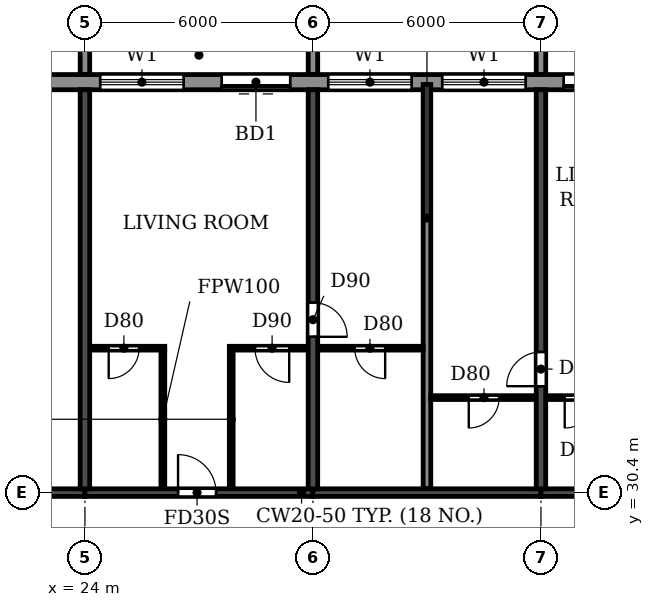
"""IFC4 building model, lengths in metres.
Left out: names, types, materials, properties, quantities, classifications, styles, units other than length and angle.
Written with IfcOpenShell. Run it as: python <this file> out.ifc"""

import sys

from ifc_helpers import new_model, si_unit, direction, frame, frame_2d, origin, place, context, subcontext, project, spatial, polyline, rectangle, outline, extrude, source, transform, mapped, element, fill, save


model = new_model("IFC4")
c1 = context("Model", 3, precision=1e-05, world=origin(), true_north=direction((0.0, 1.0)))
c2 = subcontext(c1, "Body", "Model", "MODEL_VIEW")
j1 = project(units=[si_unit("LENGTHUNIT", "METRE"), si_unit("PLANEANGLEUNIT", "RADIAN")], contexts=[c1])
p1 = place(None, origin())
s1 = spatial("IfcSite", under=j1, at=p1, CompositionType="ELEMENT")
p2 = place(p1, origin())
s2 = spatial("IfcBuilding", under=s1, at=p2, CompositionType="ELEMENT")
p3 = place(p2, frame((0.0, 0.0, 171.9)))
s3 = spatial("IfcBuildingStorey", under=s2, at=p3, CompositionType="ELEMENT", Elevation=171.9)
p4 = place(p3, frame((24.0, 30.5, 0.0), z_axis=(0.0, 0.0, 1.0), x_axis=(0.0, 1.0, 0.0)))
e1 = element("IfcWall", 1, at=p4, inside=s3, PredefinedType="SHEAR", context=c2, shape_type="SweptSolid", body=[
    extrude(rectangle(XDim=10.5, YDim=0.25, at=frame_2d((5.25, 0.0))), origin(), (0.0, 0.0, 1.0), 3.08),
])
p5 = place(p3, frame((30.0, 30.5, 0.0), z_axis=(0.0, 0.0, 1.0), x_axis=(0.0, 1.0, 0.0)))
e2 = element("IfcWall", 2, at=p5, inside=s3, PredefinedType="SHEAR", context=c2, shape_type="SweptSolid", body=[
    extrude(rectangle(XDim=10.5, YDim=0.25, at=frame_2d((5.25, 0.0))), origin(), (0.0, 0.0, 1.0), 3.08),
])
p6 = place(p5, frame((4.0, 0.0, 0.0)))
e3 = element("IfcOpeningElement", 3, at=p6, cuts=e2, PredefinedType="OPENING", context=c2, shape_type="SweptSolid", body=[
    extrude(rectangle(XDim=0.9, YDim=2.1, at=frame_2d((0.45, 1.05))), frame((0.0, 0.135, 0.0), z_axis=(0.0, -1.0, 0.0), x_axis=(1.0, 0.0, 0.0)), (0.0, 0.0, 1.0), 0.27),
])
p7 = place(p3, frame((36.0, 30.5, 0.0), z_axis=(0.0, 0.0, 1.0), x_axis=(0.0, 1.0, 0.0)))
e4 = element("IfcWall", 4, at=p7, inside=s3, PredefinedType="SHEAR", context=c2, shape_type="SweptSolid", body=[
    extrude(rectangle(XDim=10.5, YDim=0.25, at=frame_2d((5.25, 0.0))), origin(), (0.0, 0.0, 1.0), 3.08),
])
p8 = place(p7, frame((2.7, 0.0, 0.0)))
e5 = element("IfcOpeningElement", 5, at=p8, cuts=e4, PredefinedType="OPENING", context=c2, shape_type="SweptSolid", body=[
    extrude(rectangle(XDim=0.9, YDim=2.1, at=frame_2d((0.45, 1.05))), frame((0.0, 0.135, 0.0), z_axis=(0.0, -1.0, 0.0), x_axis=(1.0, 0.0, 0.0)), (0.0, 0.0, 1.0), 0.27),
])
p9 = place(p3, frame((18.2, 30.4, 0.0), z_axis=(0.0, 0.0, 1.0), x_axis=(1.0, 0.0, 0.0)))
e6 = element("IfcWall", 6, at=p9, inside=s3, PredefinedType="SHEAR", context=c2, shape_type="SweptSolid", body=[
    extrude(rectangle(XDim=5.8, YDim=0.2, at=frame_2d((2.9, 0.0))), origin(), (0.0, 0.0, 1.0), 2.48),
])
p10 = place(p9, frame((2.3, 0.0, 0.0)))
e7 = element("IfcOpeningElement", 7, at=p10, cuts=e6, PredefinedType="OPENING", context=c2, shape_type="SweptSolid", body=[
    extrude(rectangle(XDim=1.0, YDim=2.1, at=frame_2d((0.5, 1.05))), frame((0.0, 0.11, 0.0), z_axis=(0.0, -1.0, 0.0), x_axis=(1.0, 0.0, 0.0)), (0.0, 0.0, 1.0), 0.22),
])
p11 = place(p3, frame((24.0, 30.4, 0.0), z_axis=(0.0, 0.0, 1.0), x_axis=(1.0, 0.0, 0.0)))
e8 = element("IfcWall", 8, at=p11, inside=s3, PredefinedType="SHEAR", context=c2, shape_type="SweptSolid", body=[
    extrude(rectangle(XDim=6.0, YDim=0.2, at=frame_2d((3.0, 0.0))), origin(), (0.0, 0.0, 1.0), 2.48),
])
p12 = place(p11, frame((2.45, 0.0, 0.0)))
e9 = element("IfcOpeningElement", 9, at=p12, cuts=e8, PredefinedType="OPENING", context=c2, shape_type="SweptSolid", body=[
    extrude(rectangle(XDim=1.0, YDim=2.1, at=frame_2d((0.5, 1.05))), frame((0.0, 0.11, 0.0), z_axis=(0.0, -1.0, 0.0), x_axis=(1.0, 0.0, 0.0)), (0.0, 0.0, 1.0), 0.22),
])
p13 = place(p3, frame((30.0, 30.4, 0.0), z_axis=(0.0, 0.0, 1.0), x_axis=(1.0, 0.0, 0.0)))
e10 = element("IfcWall", 10, at=p13, inside=s3, PredefinedType="SHEAR", context=c2, shape_type="SweptSolid", body=[
    extrude(rectangle(XDim=6.0, YDim=0.2, at=frame_2d((3.0, 0.0))), origin(), (0.0, 0.0, 1.0), 2.48),
])
p14 = place(p3, frame((36.0, 30.4, 0.0), z_axis=(0.0, 0.0, 1.0), x_axis=(1.0, 0.0, 0.0)))
e11 = element("IfcWall", 11, at=p14, inside=s3, PredefinedType="SHEAR", context=c2, shape_type="SweptSolid", body=[
    extrude(rectangle(XDim=6.0, YDim=0.2, at=frame_2d((3.0, 0.0))), origin(), (0.0, 0.0, 1.0), 2.48),
])
p15 = place(p14, frame((2.45, 0.0, 0.0)))
e12 = element("IfcOpeningElement", 12, at=p15, cuts=e11, PredefinedType="OPENING", context=c2, shape_type="SweptSolid", body=[
    extrude(rectangle(XDim=1.0, YDim=2.1, at=frame_2d((0.5, 1.05))), frame((0.0, 0.11, 0.0), z_axis=(0.0, -1.0, 0.0), x_axis=(1.0, 0.0, 0.0)), (0.0, 0.0, 1.0), 0.22),
])
p16 = place(p3, frame((79.317, 41.2, 0.0), z_axis=(0.0, 0.0, 1.0), x_axis=(-1.0, 0.0, 0.0)))
e13 = element("IfcWall", 13, at=p16, inside=s3, PredefinedType="STANDARD", context=c2, shape_type="SweptSolid", body=[
    extrude(rectangle(XDim=56.634, YDim=0.4, at=frame_2d((28.317, 0.0))), origin(), (0.0, 0.0, 1.0), 3.08),
])
p17 = place(p16, frame((52.717, 0.0, 0.9)))
e14 = element("IfcOpeningElement", 14, at=p17, cuts=e13, PredefinedType="OPENING", context=c2, shape_type="SweptSolid", body=[
    extrude(rectangle(XDim=2.2, YDim=1.5, at=frame_2d((1.1, 0.75))), frame((0.0, 0.21, 0.0), z_axis=(0.0, -1.0, 0.0), x_axis=(1.0, 0.0, 0.0)), (0.0, 0.0, 1.0), 0.42),
])
p18 = place(p16, frame((49.917, 0.0, 0.0)))
e15 = element("IfcOpeningElement", 15, at=p18, cuts=e13, PredefinedType="OPENING", context=c2, shape_type="SweptSolid", body=[
    extrude(rectangle(XDim=1.8, YDim=2.4, at=frame_2d((0.9, 1.2))), frame((0.0, 0.21, 0.0), z_axis=(0.0, -1.0, 0.0), x_axis=(1.0, 0.0, 0.0)), (0.0, 0.0, 1.0), 0.42),
])
p19 = place(p16, frame((46.717, 0.0, 0.9)))
e16 = element("IfcOpeningElement", 16, at=p19, cuts=e13, PredefinedType="OPENING", context=c2, shape_type="SweptSolid", body=[
    extrude(rectangle(XDim=2.2, YDim=1.5, at=frame_2d((1.1, 0.75))), frame((0.0, 0.21, 0.0), z_axis=(0.0, -1.0, 0.0), x_axis=(1.0, 0.0, 0.0)), (0.0, 0.0, 1.0), 0.42),
])
p20 = place(p16, frame((43.717, 0.0, 0.9)))
e17 = element("IfcOpeningElement", 17, at=p20, cuts=e13, PredefinedType="OPENING", context=c2, shape_type="SweptSolid", body=[
    extrude(rectangle(XDim=2.2, YDim=1.5, at=frame_2d((1.1, 0.75))), frame((0.0, 0.21, 0.0), z_axis=(0.0, -1.0, 0.0), x_axis=(1.0, 0.0, 0.0)), (0.0, 0.0, 1.0), 0.42),
])
p21 = place(p16, frame((40.917, 0.0, 0.0)))
e18 = element("IfcOpeningElement", 18, at=p21, cuts=e13, PredefinedType="OPENING", context=c2, shape_type="SweptSolid", body=[
    extrude(rectangle(XDim=1.8, YDim=2.4, at=frame_2d((0.9, 1.2))), frame((0.0, 0.21, 0.0), z_axis=(0.0, -1.0, 0.0), x_axis=(1.0, 0.0, 0.0)), (0.0, 0.0, 1.0), 0.42),
])
p22 = place(p16, frame((37.717, 0.0, 0.9)))
e19 = element("IfcOpeningElement", 19, at=p22, cuts=e13, PredefinedType="OPENING", context=c2, shape_type="SweptSolid", body=[
    extrude(rectangle(XDim=2.2, YDim=1.5, at=frame_2d((1.1, 0.75))), frame((0.0, 0.21, 0.0), z_axis=(0.0, -1.0, 0.0), x_axis=(1.0, 0.0, 0.0)), (0.0, 0.0, 1.0), 0.42),
])
p23 = place(p16, frame((34.717, 0.0, 0.9)))
e20 = element("IfcOpeningElement", 20, at=p23, cuts=e13, PredefinedType="OPENING", context=c2, shape_type="SweptSolid", body=[
    extrude(rectangle(XDim=2.2, YDim=1.5, at=frame_2d((1.1, 0.75))), frame((0.0, 0.21, 0.0), z_axis=(0.0, -1.0, 0.0), x_axis=(1.0, 0.0, 0.0)), (0.0, 0.0, 1.0), 0.42),
])
p24 = place(p16, frame((31.717, 0.0, 0.9)))
e21 = element("IfcOpeningElement", 21, at=p24, cuts=e13, PredefinedType="OPENING", context=c2, shape_type="SweptSolid", body=[
    extrude(rectangle(XDim=2.2, YDim=1.5, at=frame_2d((1.1, 0.75))), frame((0.0, 0.21, 0.0), z_axis=(0.0, -1.0, 0.0), x_axis=(1.0, 0.0, 0.0)), (0.0, 0.0, 1.0), 0.42),
])
p25 = place(p16, frame((28.717, 0.0, 0.9)))
e22 = element("IfcOpeningElement", 22, at=p25, cuts=e13, PredefinedType="OPENING", context=c2, shape_type="SweptSolid", body=[
    extrude(rectangle(XDim=2.2, YDim=1.5, at=frame_2d((1.1, 0.75))), frame((0.0, 0.21, 0.0), z_axis=(0.0, -1.0, 0.0), x_axis=(1.0, 0.0, 0.0)), (0.0, 0.0, 1.0), 0.42),
])
p26 = place(p16, frame((25.917, 0.0, 0.0)))
e23 = element("IfcOpeningElement", 23, at=p26, cuts=e13, PredefinedType="OPENING", context=c2, shape_type="SweptSolid", body=[
    extrude(rectangle(XDim=1.8, YDim=2.4, at=frame_2d((0.9, 1.2))), frame((0.0, 0.21, 0.0), z_axis=(0.0, -1.0, 0.0), x_axis=(1.0, 0.0, 0.0)), (0.0, 0.0, 1.0), 0.42),
])
p27 = place(p16, frame((22.717, 0.0, 0.9)))
e24 = element("IfcOpeningElement", 24, at=p27, cuts=e13, PredefinedType="OPENING", context=c2, shape_type="SweptSolid", body=[
    extrude(rectangle(XDim=2.2, YDim=1.5, at=frame_2d((1.1, 0.75))), frame((0.0, 0.21, 0.0), z_axis=(0.0, -1.0, 0.0), x_axis=(1.0, 0.0, 0.0)), (0.0, 0.0, 1.0), 0.42),
])
p28 = place(p16, frame((19.917, 0.0, 0.0)))
e25 = element("IfcOpeningElement", 25, at=p28, cuts=e13, PredefinedType="OPENING", context=c2, shape_type="SweptSolid", body=[
    extrude(rectangle(XDim=1.8, YDim=2.4, at=frame_2d((0.9, 1.2))), frame((0.0, 0.21, 0.0), z_axis=(0.0, -1.0, 0.0), x_axis=(1.0, 0.0, 0.0)), (0.0, 0.0, 1.0), 0.42),
])
p29 = place(p16, frame((16.717, 0.0, 0.9)))
e26 = element("IfcOpeningElement", 26, at=p29, cuts=e13, PredefinedType="OPENING", context=c2, shape_type="SweptSolid", body=[
    extrude(rectangle(XDim=2.2, YDim=1.5, at=frame_2d((1.1, 0.75))), frame((0.0, 0.21, 0.0), z_axis=(0.0, -1.0, 0.0), x_axis=(1.0, 0.0, 0.0)), (0.0, 0.0, 1.0), 0.42),
])
p30 = place(p16, frame((13.717, 0.0, 0.9)))
e27 = element("IfcOpeningElement", 27, at=p30, cuts=e13, PredefinedType="OPENING", context=c2, shape_type="SweptSolid", body=[
    extrude(rectangle(XDim=2.2, YDim=1.5, at=frame_2d((1.1, 0.75))), frame((0.0, 0.21, 0.0), z_axis=(0.0, -1.0, 0.0), x_axis=(1.0, 0.0, 0.0)), (0.0, 0.0, 1.0), 0.42),
])
p31 = place(p16, frame((10.917, 0.0, 0.0)))
e28 = element("IfcOpeningElement", 28, at=p31, cuts=e13, PredefinedType="OPENING", context=c2, shape_type="SweptSolid", body=[
    extrude(rectangle(XDim=1.8, YDim=2.4, at=frame_2d((0.9, 1.2))), frame((0.0, 0.21, 0.0), z_axis=(0.0, -1.0, 0.0), x_axis=(1.0, 0.0, 0.0)), (0.0, 0.0, 1.0), 0.42),
])
p32 = place(p16, frame((7.717, 0.0, 0.9)))
e29 = element("IfcOpeningElement", 29, at=p32, cuts=e13, PredefinedType="OPENING", context=c2, shape_type="SweptSolid", body=[
    extrude(rectangle(XDim=2.2, YDim=1.5, at=frame_2d((1.1, 0.75))), frame((0.0, 0.21, 0.0), z_axis=(0.0, -1.0, 0.0), x_axis=(1.0, 0.0, 0.0)), (0.0, 0.0, 1.0), 0.42),
])
p33 = place(p16, frame((4.717, 0.0, 0.9)))
e30 = element("IfcOpeningElement", 30, at=p33, cuts=e13, PredefinedType="OPENING", context=c2, shape_type="SweptSolid", body=[
    extrude(rectangle(XDim=2.2, YDim=1.5, at=frame_2d((1.1, 0.75))), frame((0.0, 0.21, 0.0), z_axis=(0.0, -1.0, 0.0), x_axis=(1.0, 0.0, 0.0)), (0.0, 0.0, 1.0), 0.42),
])
p34 = place(p16, frame((1.917, 0.0, 0.0)))
e31 = element("IfcOpeningElement", 31, at=p34, cuts=e13, PredefinedType="OPENING", context=c2, shape_type="SweptSolid", body=[
    extrude(rectangle(XDim=1.8, YDim=2.4, at=frame_2d((0.9, 1.2))), frame((0.0, 0.21, 0.0), z_axis=(0.0, -1.0, 0.0), x_axis=(1.0, 0.0, 0.0)), (0.0, 0.0, 1.0), 0.42),
])
m1 = source(origin(), c2, "Body", "SweptSolid", [
    extrude(outline(polyline([(0.0, 0.0), (0.25, 0.0), (0.25, 3.1), (0.0, 3.1), (0.0, 0.0)])), origin(), (0.0, 0.0, 1.0), 3.1),
])
for number, where in (
    (32, (23.875, 41.4, 0.0)),
    (33, (29.875, 41.4, 0.0)),
    (34, (35.875, 41.4, 0.0)),
):
    element("IfcWall", number, at=place(p3, frame(where)), inside=s3, PredefinedType="STANDARD", context=c2, shape_type="MappedRepresentation", body=[
        mapped(m1, transform((0.0, 0.0, 0.0))),
    ])
p35 = place(p3, frame((33.0, 30.51, 0.0), z_axis=(0.0, 0.0, 1.0), x_axis=(0.0, 1.0, 0.0)))
e35 = element("IfcWall", 35, at=p35, inside=s3, PredefinedType="PARTITIONING", context=c2, shape_type="SweptSolid", body=[
    extrude(rectangle(XDim=10.63, YDim=0.2, at=frame_2d((5.315, 0.0))), origin(), (0.0, 0.0, 1.0), 3.08),
])
p36 = place(p3, frame((33.1, 32.9, 0.0), z_axis=(0.0, 0.0, 1.0), x_axis=(1.0, 0.0, 0.0)))
e36 = element("IfcWall", 36, at=p36, inside=s3, PredefinedType="PARTITIONING", context=c2, shape_type="SweptSolid", body=[
    extrude(rectangle(XDim=2.765, YDim=0.1, at=frame_2d((1.382, 0.0))), origin(), (0.0, 0.0, 1.0), 3.08),
])
p37 = place(p36, frame((1.0, 0.0, 0.0)))
e37 = element("IfcOpeningElement", 37, at=p37, cuts=e36, PredefinedType="OPENING", context=c2, shape_type="SweptSolid", body=[
    extrude(rectangle(XDim=0.8, YDim=2.1, at=frame_2d((0.4, 1.05))), frame((0.0, 0.06, 0.0), z_axis=(0.0, -1.0, 0.0), x_axis=(1.0, 0.0, 0.0)), (0.0, 0.0, 1.0), 0.12),
])
p38 = place(p3, frame((36.135, 32.9, 0.0), z_axis=(0.0, 0.0, 1.0), x_axis=(1.0, 0.0, 0.0)))
e38 = element("IfcWall", 38, at=p38, inside=s3, PredefinedType="PARTITIONING", context=c2, shape_type="SweptSolid", body=[
    extrude(rectangle(XDim=1.965, YDim=0.1, at=frame_2d((0.982, 0.0))), origin(), (0.0, 0.0, 1.0), 3.08),
])
p39 = place(p38, frame((0.49, 0.0, 0.0)))
e39 = element("IfcOpeningElement", 39, at=p39, cuts=e38, PredefinedType="OPENING", context=c2, shape_type="SweptSolid", body=[
    extrude(rectangle(XDim=0.8, YDim=2.1, at=frame_2d((0.4, 1.05))), frame((0.0, 0.06, 0.0), z_axis=(0.0, -1.0, 0.0), x_axis=(1.0, 0.0, 0.0)), (0.0, 0.0, 1.0), 0.12),
])
p40 = place(p3, frame((24.135, 34.2, 0.0), z_axis=(0.0, 0.0, 1.0), x_axis=(1.0, 0.0, 0.0)))
e40 = element("IfcWall", 40, at=p40, inside=s3, PredefinedType="PARTITIONING", context=c2, shape_type="SweptSolid", body=[
    extrude(rectangle(XDim=1.965, YDim=0.1, at=frame_2d((0.982, 0.0))), origin(), (0.0, 0.0, 1.0), 3.08),
])
p41 = place(p40, frame((0.49, 0.0, 0.0)))
e41 = element("IfcOpeningElement", 41, at=p41, cuts=e40, PredefinedType="OPENING", context=c2, shape_type="SweptSolid", body=[
    extrude(rectangle(XDim=0.8, YDim=2.1, at=frame_2d((0.4, 1.05))), frame((0.0, 0.06, 0.0), z_axis=(0.0, -1.0, 0.0), x_axis=(1.0, 0.0, 0.0)), (0.0, 0.0, 1.0), 0.12),
])
p42 = place(p3, frame((27.8, 34.2, 0.0), z_axis=(0.0, 0.0, 1.0), x_axis=(1.0, 0.0, 0.0)))
e42 = element("IfcWall", 42, at=p42, inside=s3, PredefinedType="PARTITIONING", context=c2, shape_type="SweptSolid", body=[
    extrude(rectangle(XDim=2.065, YDim=0.1, at=frame_2d((1.032, 0.0))), origin(), (0.0, 0.0, 1.0), 3.08),
])
p43 = place(p42, frame((0.675, 0.0, 0.0)))
e43 = element("IfcOpeningElement", 43, at=p43, cuts=e42, PredefinedType="OPENING", context=c2, shape_type="SweptSolid", body=[
    extrude(rectangle(XDim=0.9, YDim=2.1, at=frame_2d((0.45, 1.05))), frame((0.0, 0.06, 0.0), z_axis=(0.0, -1.0, 0.0), x_axis=(1.0, 0.0, 0.0)), (0.0, 0.0, 1.0), 0.12),
])
p44 = place(p3, frame((30.135, 34.2, 0.0), z_axis=(0.0, 0.0, 1.0), x_axis=(1.0, 0.0, 0.0)))
e44 = element("IfcWall", 44, at=p44, inside=s3, PredefinedType="PARTITIONING", context=c2, shape_type="SweptSolid", body=[
    extrude(rectangle(XDim=2.765, YDim=0.1, at=frame_2d((1.382, 0.0))), origin(), (0.0, 0.0, 1.0), 3.08),
])
p45 = place(p44, frame((0.965, 0.0, 0.0)))
e45 = element("IfcOpeningElement", 45, at=p45, cuts=e44, PredefinedType="OPENING", context=c2, shape_type="SweptSolid", body=[
    extrude(rectangle(XDim=0.8, YDim=2.1, at=frame_2d((0.4, 1.05))), frame((0.0, 0.06, 0.0), z_axis=(0.0, -1.0, 0.0), x_axis=(1.0, 0.0, 0.0)), (0.0, 0.0, 1.0), 0.12),
])
for number, where, z_axis, x_axis in (
    (46, (26.05, 30.51, 0.0), (0.0, 0.0, 1.0), (0.0, 1.0, 0.0)),
    (47, (27.85, 30.51, 0.0), (0.0, 0.0, 1.0), (0.0, 1.0, 0.0)),
):
    element("IfcWall", number, at=place(p3, frame(where, z_axis=z_axis, x_axis=x_axis)), inside=s3, PredefinedType="PARTITIONING", context=c2, shape_type="SweptSolid", body=[
        extrude(rectangle(XDim=3.64, YDim=0.1, at=frame_2d((1.82, 0.0))), origin(), (0.0, 0.0, 1.0), 3.08),
    ])
p46 = place(p17, origin())
e48 = element("IfcWindow", 48, at=p46, inside=s3, PartitioningType="DOUBLE_PANEL_HORIZONTAL", PredefinedType="WINDOW", context=c2, shape_type="SweptSolid", body=[
    extrude(rectangle(XDim=2.2, YDim=1.5, at=frame_2d((1.1, 0.75))), frame((0.0, 0.03, 0.0), z_axis=(0.0, -1.0, 0.0), x_axis=(1.0, 0.0, 0.0)), (0.0, 0.0, 1.0), 0.06),
])
fill(e14, e48)
p47 = place(p18, origin())
e49 = element("IfcDoor", 49, at=p47, inside=s3, OperationType="DOUBLE_DOOR_SLIDING", PredefinedType="DOOR", context=c2, shape_type="SweptSolid", body=[
    extrude(rectangle(XDim=1.8, YDim=2.4, at=frame_2d((0.9, 1.2))), frame((0.0, 0.025, 0.0), z_axis=(0.0, -1.0, 0.0), x_axis=(1.0, 0.0, 0.0)), (0.0, 0.0, 1.0), 0.05),
])
fill(e15, e49)
p48 = place(p19, origin())
e50 = element("IfcWindow", 50, at=p48, inside=s3, PartitioningType="DOUBLE_PANEL_HORIZONTAL", PredefinedType="WINDOW", context=c2, shape_type="SweptSolid", body=[
    extrude(rectangle(XDim=2.2, YDim=1.5, at=frame_2d((1.1, 0.75))), frame((0.0, 0.03, 0.0), z_axis=(0.0, -1.0, 0.0), x_axis=(1.0, 0.0, 0.0)), (0.0, 0.0, 1.0), 0.06),
])
fill(e16, e50)
p49 = place(p20, origin())
e51 = element("IfcWindow", 51, at=p49, inside=s3, PartitioningType="DOUBLE_PANEL_HORIZONTAL", PredefinedType="WINDOW", context=c2, shape_type="SweptSolid", body=[
    extrude(rectangle(XDim=2.2, YDim=1.5, at=frame_2d((1.1, 0.75))), frame((0.0, 0.03, 0.0), z_axis=(0.0, -1.0, 0.0), x_axis=(1.0, 0.0, 0.0)), (0.0, 0.0, 1.0), 0.06),
])
fill(e17, e51)
p50 = place(p21, origin())
e52 = element("IfcDoor", 52, at=p50, inside=s3, OperationType="DOUBLE_DOOR_SLIDING", PredefinedType="DOOR", context=c2, shape_type="SweptSolid", body=[
    extrude(rectangle(XDim=1.8, YDim=2.4, at=frame_2d((0.9, 1.2))), frame((0.0, 0.025, 0.0), z_axis=(0.0, -1.0, 0.0), x_axis=(1.0, 0.0, 0.0)), (0.0, 0.0, 1.0), 0.05),
])
fill(e18, e52)
p51 = place(p45, frame((0.8, 0.0, 0.0), z_axis=(0.0, 0.0, 1.0), x_axis=(-1.0, 0.0, 0.0)))
e53 = element("IfcDoor", 53, at=p51, inside=s3, OperationType="SINGLE_SWING_LEFT", PredefinedType="DOOR", context=c2, shape_type="SweptSolid", body=[
    extrude(rectangle(XDim=0.8, YDim=2.1, at=frame_2d((0.4, 1.05))), frame((0.0, 0.025, 0.0), z_axis=(0.0, -1.0, 0.0), x_axis=(1.0, 0.0, 0.0)), (0.0, 0.0, 1.0), 0.05),
])
fill(e45, e53)
p52 = place(p41, frame((0.8, 0.0, 0.0), z_axis=(0.0, 0.0, 1.0), x_axis=(-1.0, 0.0, 0.0)))
e54 = element("IfcDoor", 54, at=p52, inside=s3, OperationType="SINGLE_SWING_RIGHT", PredefinedType="DOOR", context=c2, shape_type="SweptSolid", body=[
    extrude(rectangle(XDim=0.8, YDim=2.1, at=frame_2d((0.4, 1.05))), frame((0.0, 0.025, 0.0), z_axis=(0.0, -1.0, 0.0), x_axis=(1.0, 0.0, 0.0)), (0.0, 0.0, 1.0), 0.05),
])
fill(e41, e54)
p53 = place(p12, origin())
e55 = element("IfcDoor", 55, at=p53, inside=s3, OperationType="SINGLE_SWING_LEFT", PredefinedType="DOOR", context=c2, shape_type="SweptSolid", body=[
    extrude(rectangle(XDim=1.0, YDim=2.1, at=frame_2d((0.5, 1.05))), frame((0.0, 0.025, 0.0), z_axis=(0.0, -1.0, 0.0), x_axis=(1.0, 0.0, 0.0)), (0.0, 0.0, 1.0), 0.05),
])
fill(e9, e55)
p54 = place(p43, frame((0.9, 0.0, 0.0), z_axis=(0.0, 0.0, 1.0), x_axis=(-1.0, 0.0, 0.0)))
e56 = element("IfcDoor", 56, at=p54, inside=s3, OperationType="SINGLE_SWING_LEFT", PredefinedType="DOOR", context=c2, shape_type="SweptSolid", body=[
    extrude(rectangle(XDim=0.9, YDim=2.1, at=frame_2d((0.45, 1.05))), frame((0.0, 0.025, 0.0), z_axis=(0.0, -1.0, 0.0), x_axis=(1.0, 0.0, 0.0)), (0.0, 0.0, 1.0), 0.05),
])
fill(e43, e56)
p55 = place(p6, frame((0.9, 0.0, 0.0), z_axis=(0.0, 0.0, 1.0), x_axis=(-1.0, 0.0, 0.0)))
e57 = element("IfcDoor", 57, at=p55, inside=s3, OperationType="SINGLE_SWING_RIGHT", PredefinedType="DOOR", context=c2, shape_type="SweptSolid", body=[
    extrude(rectangle(XDim=0.9, YDim=2.1, at=frame_2d((0.45, 1.05))), frame((0.0, 0.025, 0.0), z_axis=(0.0, -1.0, 0.0), x_axis=(1.0, 0.0, 0.0)), (0.0, 0.0, 1.0), 0.05),
])
fill(e3, e57)
p56 = place(p37, frame((0.8, 0.0, 0.0), z_axis=(0.0, 0.0, 1.0), x_axis=(-1.0, 0.0, 0.0)))
e58 = element("IfcDoor", 58, at=p56, inside=s3, OperationType="SINGLE_SWING_RIGHT", PredefinedType="DOOR", context=c2, shape_type="SweptSolid", body=[
    extrude(rectangle(XDim=0.8, YDim=2.1, at=frame_2d((0.4, 1.05))), frame((0.0, 0.025, 0.0), z_axis=(0.0, -1.0, 0.0), x_axis=(1.0, 0.0, 0.0)), (0.0, 0.0, 1.0), 0.05),
])
fill(e37, e58)
p57 = place(p8, origin())
e59 = element("IfcDoor", 59, at=p57, inside=s3, OperationType="SINGLE_SWING_LEFT", PredefinedType="DOOR", context=c2, shape_type="SweptSolid", body=[
    extrude(rectangle(XDim=0.9, YDim=2.1, at=frame_2d((0.45, 1.05))), frame((0.0, 0.025, 0.0), z_axis=(0.0, -1.0, 0.0), x_axis=(1.0, 0.0, 0.0)), (0.0, 0.0, 1.0), 0.05),
])
fill(e5, e59)
p58 = place(p39, frame((0.8, 0.0, 0.0), z_axis=(0.0, 0.0, 1.0), x_axis=(-1.0, 0.0, 0.0)))
e60 = element("IfcDoor", 60, at=p58, inside=s3, OperationType="SINGLE_SWING_RIGHT", PredefinedType="DOOR", context=c2, shape_type="SweptSolid", body=[
    extrude(rectangle(XDim=0.8, YDim=2.1, at=frame_2d((0.4, 1.05))), frame((0.0, 0.025, 0.0), z_axis=(0.0, -1.0, 0.0), x_axis=(1.0, 0.0, 0.0)), (0.0, 0.0, 1.0), 0.05),
])
fill(e39, e60)
save(model, sys.argv[1])
